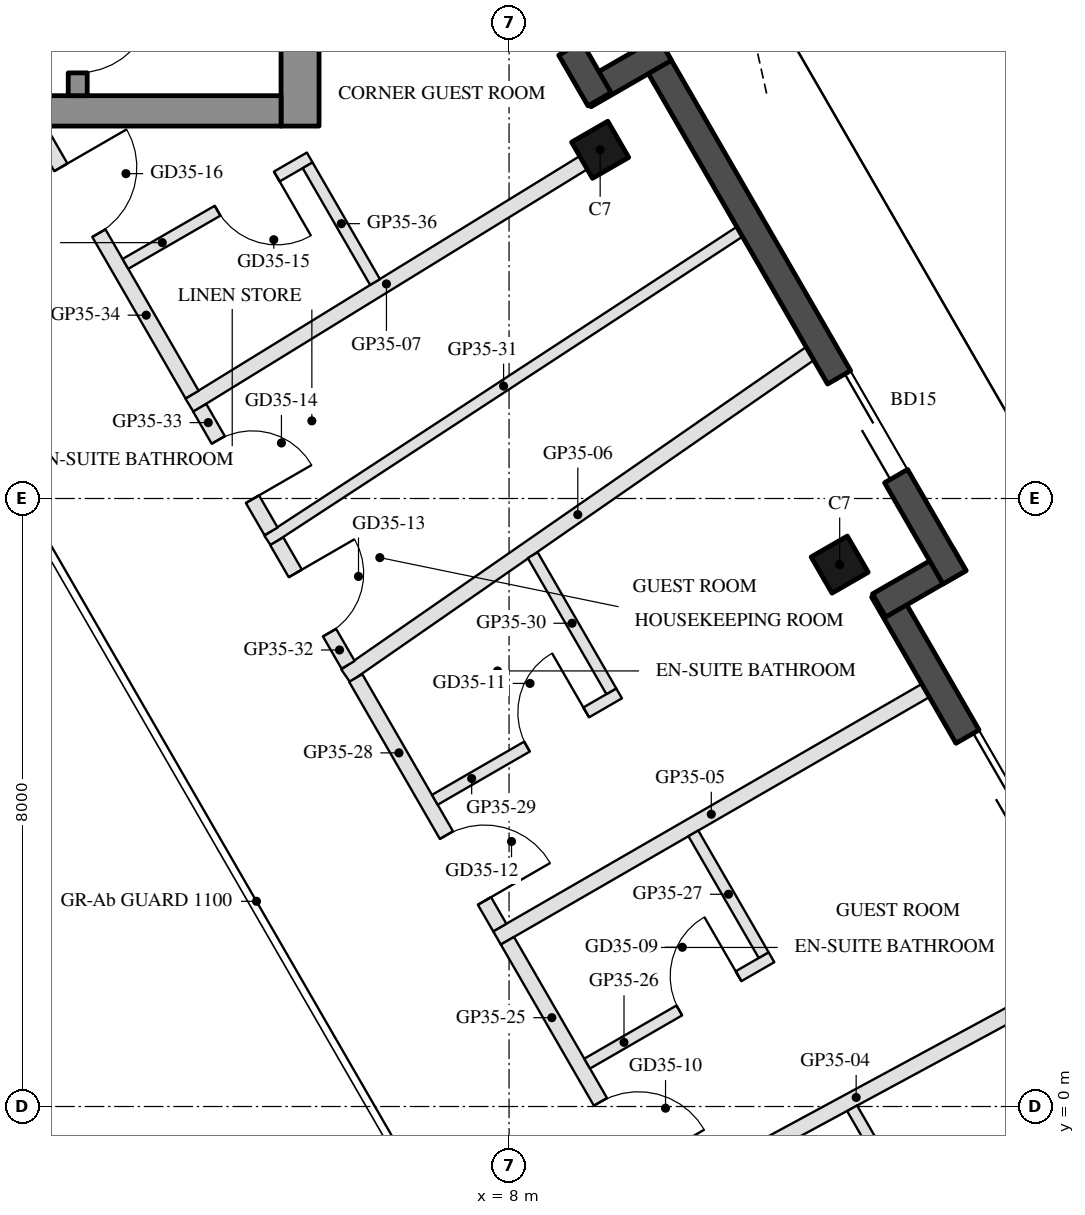
"""IFC4 building model, lengths in metres.
Left out: names, types, materials, properties, quantities, classifications, styles, units other than length and angle.
Written with IfcOpenShell. Run it as: python <this file> out.ifc"""

import sys

from ifc_helpers import new_model, si_unit, direction, frame, frame_2d, origin, origin_2d, place, context, subcontext, project, spatial, rectangle, hollow_rectangle, extrude, boolean, halfspace, element, fill, save


model = new_model("IFC4")
c1 = context("Model", 3, precision=1e-05, world=origin(), true_north=direction((0.0, 1.0)))
c2 = subcontext(c1, "Body", "Model", "MODEL_VIEW")
j1 = project(units=[si_unit("LENGTHUNIT", "METRE"), si_unit("PLANEANGLEUNIT", "RADIAN")], contexts=[c1])
p1 = place(None, origin())
s1 = spatial("IfcSite", under=j1, at=p1, CompositionType="ELEMENT")
p2 = place(p1, origin())
s2 = spatial("IfcBuilding", under=s1, at=p2, CompositionType="ELEMENT")
p3 = place(p2, frame((0.0, 0.0, 324.4)))
s3 = spatial("IfcBuildingStorey", under=s2, at=p3, CompositionType="ELEMENT", Elevation=324.4)
p4 = place(p3, frame((12.35, 7.13, 0.0), z_axis=(0.0, 0.0, 1.0), x_axis=(-0.5, 0.866025403784, 0.0)))
e1 = element("IfcColumn", 1, at=p4, inside=s3, PredefinedType="COLUMN", context=c2, shape_type="SweptSolid", body=[
    boolean("DIFFERENCE", boolean("DIFFERENCE", extrude(hollow_rectangle(XDim=0.55, YDim=0.55, WallThickness=0.025, at=origin_2d()), origin(), (0.0, 0.0, 1.0), 3.7), halfspace(frame((0.0, 0.0, 0.031), z_axis=(0.0, 0.0, 1.0), x_axis=(1.0, 0.0, 0.0)), True)), halfspace(frame((0.0, 0.0, 3.669), z_axis=(0.0, 0.0, 1.0), x_axis=(1.0, 0.0, 0.0)), False)),
])
p5 = place(p3, frame((9.198, 12.588, 0.0), z_axis=(0.0, 0.0, 1.0), x_axis=(-0.5, 0.866025403784, 0.0)))
e2 = element("IfcColumn", 2, at=p5, inside=s3, PredefinedType="COLUMN", context=c2, shape_type="SweptSolid", body=[
    boolean("DIFFERENCE", boolean("DIFFERENCE", extrude(hollow_rectangle(XDim=0.55, YDim=0.55, WallThickness=0.025, at=origin_2d()), origin(), (0.0, 0.0, 1.0), 3.7), halfspace(frame((0.0, 0.0, 0.034), z_axis=(0.0, 0.0, 1.0), x_axis=(1.0, 0.0, 0.0)), True)), halfspace(frame((0.0, 0.0, 3.666), z_axis=(0.0, 0.0, 1.0), x_axis=(1.0, 0.0, 0.0)), False)),
])
p6 = place(p3, frame((15.492, 2.337, 0.0), z_axis=(0.0, 0.0, 1.0), x_axis=(-0.499999159329, 0.866025889145, 0.0)))
e3 = element("IfcWall", 3, at=p6, inside=s3, PredefinedType="SOLIDWALL", context=c2, shape_type="SweptSolid", body=[
    extrude(rectangle(XDim=5.143, YDim=0.35, at=frame_2d((2.571, 0.0))), origin(), (0.0, 0.0, 1.0), 3.55),
])
p7 = place(p6, frame((1.122, 0.0, 0.0)))
e4 = element("IfcOpeningElement", 4, at=p7, cuts=e3, PredefinedType="OPENING", context=c2, shape_type="SweptSolid", body=[
    extrude(rectangle(XDim=1.8, YDim=2.4, at=frame_2d((0.9, 1.2))), frame((0.0, 0.185, 0.0), z_axis=(0.0, -1.0, 0.0), x_axis=(1.0, 0.0, 0.0)), (0.0, 0.0, 1.0), 0.37),
])
p8 = place(p3, frame((12.868, 6.592, 0.0), z_axis=(0.0, 0.0, 1.0), x_axis=(0.866005645448, 0.500034220881, 0.0)))
e5 = element("IfcWall", 5, at=p8, inside=s3, PredefinedType="SOLIDWALL", context=c2, shape_type="SweptSolid", body=[
    extrude(rectangle(XDim=1.22, YDim=0.35, at=frame_2d((0.61, 0.0))), origin(), (0.0, 0.0, 1.0), 3.55),
])
p9 = place(p3, frame((13.861, 6.963, 0.0), z_axis=(0.0, 0.0, 1.0), x_axis=(-0.499985896038, 0.866033546558, 0.0)))
e6 = element("IfcWall", 6, at=p9, inside=s3, PredefinedType="SOLIDWALL", context=c2, shape_type="SweptSolid", body=[
    extrude(rectangle(XDim=8.102, YDim=0.35, at=frame_2d((4.051, 0.0))), origin(), (0.0, 0.0, 1.0), 3.55),
])
p10 = place(p9, frame((1.537, 0.0, 0.0)))
e7 = element("IfcOpeningElement", 7, at=p10, cuts=e6, PredefinedType="OPENING", context=c2, shape_type="SweptSolid", body=[
    extrude(rectangle(XDim=1.5, YDim=2.4, at=frame_2d((0.75, 1.2))), frame((0.0, 0.185, 0.0), z_axis=(0.0, -1.0, 0.0), x_axis=(1.0, 0.0, 0.0)), (0.0, 0.0, 1.0), 0.37),
])
p11 = place(p3, frame((10.049, 13.916, 0.0), z_axis=(0.0, 0.0, 1.0), x_axis=(-0.866005645448, -0.500034220881, 0.0)))
e8 = element("IfcWall", 8, at=p11, inside=s3, PredefinedType="SOLIDWALL", context=c2, shape_type="SweptSolid", body=[
    extrude(rectangle(XDim=1.22, YDim=0.35, at=frame_2d((0.61, 0.0))), origin(), (0.0, 0.0, 1.0), 3.55),
])
p12 = place(p3, frame((9.19, 13.253, 0.0), z_axis=(0.0, 0.0, 1.0), x_axis=(-0.499963552308, 0.866046445846, 0.0)))
e9 = element("IfcWall", 9, at=p12, inside=s3, PredefinedType="SOLIDWALL", context=c2, shape_type="SweptSolid", body=[
    extrude(rectangle(XDim=5.143, YDim=0.35, at=frame_2d((2.571, 0.0))), origin(), (0.0, 0.0, 1.0), 3.55),
])
p13 = place(p12, frame((0.77, 0.0, 0.0)))
e10 = element("IfcOpeningElement", 10, at=p13, cuts=e9, PredefinedType="OPENING", context=c2, shape_type="SweptSolid", body=[
    extrude(rectangle(XDim=2.4, YDim=2.4, at=frame_2d((1.2, 1.2))), frame((0.0, 0.185, 0.0), z_axis=(0.0, -1.0, 0.0), x_axis=(1.0, 0.0, 0.0)), (0.0, 0.0, 1.0), 0.37),
])
p14 = place(p12, frame((3.47, 0.0, 0.3)))
e11 = element("IfcOpeningElement", 11, at=p14, cuts=e9, PredefinedType="OPENING", context=c2, shape_type="SweptSolid", body=[
    extrude(rectangle(XDim=1.3, YDim=2.65, at=frame_2d((0.65, 1.325))), frame((0.0, 0.185, 0.0), z_axis=(0.0, -1.0, 0.0), x_axis=(1.0, 0.0, 0.0)), (0.0, 0.0, 1.0), 0.37),
])
p15 = place(p3, frame((5.25, 12.9, 0.0), z_axis=(0.0, 0.0, 1.0), x_axis=(0.0, 1.0, 0.0)))
e12 = element("IfcWall", 12, at=p15, inside=s3, PredefinedType="SHEAR", context=c2, shape_type="SweptSolid", body=[
    extrude(rectangle(XDim=8.267, YDim=0.5, at=frame_2d((4.134, 0.0))), origin(), (0.0, 0.0, 1.0), 3.5),
])
p16 = place(p3, frame((5.0, 13.1, 0.0), z_axis=(0.0, 0.0, 1.0), x_axis=(-1.0, 0.0, 0.0)))
e13 = element("IfcWall", 13, at=p16, inside=s3, PredefinedType="SHEAR", context=c2, shape_type="SweptSolid", body=[
    extrude(rectangle(XDim=10.0, YDim=0.4, at=frame_2d((5.0, 0.0))), origin(), (0.0, 0.0, 1.0), 3.5),
])
p17 = place(p16, frame((3.55, 0.0, 0.0)))
e14 = element("IfcOpeningElement", 14, at=p17, cuts=e13, PredefinedType="OPENING", context=c2, shape_type="SweptSolid", body=[
    extrude(rectangle(XDim=1.1, YDim=2.1, at=frame_2d((0.55, 1.05))), frame((0.0, 0.21, 0.0), z_axis=(0.0, -1.0, 0.0), x_axis=(1.0, 0.0, 0.0)), (0.0, 0.0, 1.0), 0.42),
])
p18 = place(p16, frame((5.85, 0.0, 0.0)))
e15 = element("IfcOpeningElement", 15, at=p18, cuts=e13, PredefinedType="OPENING", context=c2, shape_type="SweptSolid", body=[
    extrude(rectangle(XDim=1.4, YDim=2.1, at=frame_2d((0.7, 1.05))), frame((0.0, 0.21, 0.0), z_axis=(0.0, -1.0, 0.0), x_axis=(1.0, 0.0, 0.0)), (0.0, 0.0, 1.0), 0.42),
])
p19 = place(p3, frame((2.325, 13.3, 0.0), z_axis=(0.0, 0.0, 1.0), x_axis=(0.0, 1.0, 0.0)))
e16 = element("IfcWall", 16, at=p19, inside=s3, PredefinedType="SHEAR", context=c2, shape_type="SweptSolid", body=[
    extrude(rectangle(XDim=6.45, YDim=0.25, at=frame_2d((3.225, 0.0))), origin(), (0.0, 0.0, 1.0), 3.5),
])
p20 = place(p19, frame((0.3, 0.0, 0.0)))
e17 = element("IfcOpeningElement", 17, at=p20, cuts=e16, PredefinedType="OPENING", context=c2, shape_type="SweptSolid", body=[
    extrude(rectangle(XDim=1.0, YDim=2.1, at=frame_2d((0.5, 1.05))), frame((0.0, 0.135, 0.0), z_axis=(0.0, -1.0, 0.0), x_axis=(1.0, 0.0, 0.0)), (0.0, 0.0, 1.0), 0.27),
])
p21 = place(p3, frame((15.244, 1.567, 0.0), z_axis=(0.0, 0.0, 1.0), x_axis=(-0.879711500968, -0.475507807575, 0.0)))
e18 = element("IfcWall", 18, at=p21, inside=s3, PredefinedType="PARTITIONING", context=c2, shape_type="SweptSolid", body=[
    extrude(rectangle(XDim=6.088, YDim=0.2, at=frame_2d((3.044, 0.0))), origin(), (0.0, 0.0, 1.0), 3.15),
])
p22 = place(p3, frame((13.48, 5.473, 0.0), z_axis=(0.0, 0.0, 1.0), x_axis=(-0.866030715483, -0.499990799755, 0.0)))
e19 = element("IfcWall", 19, at=p22, inside=s3, PredefinedType="PARTITIONING", context=c2, shape_type="SweptSolid", body=[
    extrude(rectangle(XDim=6.51, YDim=0.2, at=frame_2d((3.255, 0.0))), origin(), (0.0, 0.0, 1.0), 3.1),
])
p23 = place(p3, frame((11.959, 9.907, 0.0), z_axis=(0.0, 0.0, 1.0), x_axis=(-0.821566459399, -0.570112754454, 0.0)))
e20 = element("IfcWall", 20, at=p23, inside=s3, PredefinedType="PARTITIONING", context=c2, shape_type="SweptSolid", body=[
    extrude(rectangle(XDim=7.436, YDim=0.2, at=frame_2d((3.718, 0.0))), origin(), (0.0, 0.0, 1.0), 3.1),
])
p24 = place(p3, frame((8.979, 12.418, 0.0), z_axis=(0.0, 0.0, 1.0), x_axis=(-0.851645923852, -0.524117563516, 0.0)))
e21 = element("IfcWall", 21, at=p24, inside=s3, PredefinedType="PARTITIONING", context=c2, shape_type="SweptSolid", body=[
    extrude(rectangle(XDim=6.088, YDim=0.2, at=frame_2d((3.044, 0.0))), origin(), (0.0, 0.0, 1.0), 3.15),
])
p25 = place(p3, frame((13.4, -1.559, 0.0), z_axis=(0.0, 0.0, 1.0), x_axis=(-0.499988586725, 0.866031993141, 0.0)))
e22 = element("IfcWall", 22, at=p25, inside=s3, PredefinedType="PARTITIONING", context=c2, shape_type="SweptSolid", body=[
    extrude(rectangle(XDim=1.773, YDim=0.15, at=frame_2d((0.887, 0.0))), origin(), (0.0, 0.0, 1.0), 3.15),
])
p26 = place(p3, frame((7.978, 2.181, 0.0), z_axis=(0.0, 0.0, 1.0), x_axis=(0.499986368499, -0.866033273792, 0.0)))
e23 = element("IfcWall", 23, at=p26, inside=s3, PredefinedType="PARTITIONING", context=c2, shape_type="SweptSolid", body=[
    extrude(rectangle(XDim=3.897, YDim=0.2, at=frame_2d((1.948, 0.0))), origin(), (0.0, 0.0, 1.0), 3.15),
])
p27 = place(p26, frame((2.448, 0.0, 0.0)))
e24 = element("IfcOpeningElement", 24, at=p27, cuts=e23, PredefinedType="OPENING", context=c2, shape_type="SweptSolid", body=[
    extrude(rectangle(XDim=1.0, YDim=2.1, at=frame_2d((0.5, 1.05))), frame((0.0, 0.11, 0.0), z_axis=(0.0, -1.0, 0.0), x_axis=(1.0, 0.0, 0.0)), (0.0, 0.0, 1.0), 0.22),
])
p28 = place(p3, frame((9.027, 0.564, 0.0), z_axis=(0.0, 0.0, 1.0), x_axis=(0.866034573852, 0.49998411664, 0.0)))
e25 = element("IfcWall", 25, at=p28, inside=s3, PredefinedType="PARTITIONING", context=c2, shape_type="SweptSolid", body=[
    extrude(rectangle(XDim=2.8, YDim=0.15, at=frame_2d((1.4, 0.0))), origin(), (0.0, 0.0, 1.0), 3.55),
])
p29 = place(p28, frame((1.4, 0.0, 0.0)))
e26 = element("IfcOpeningElement", 26, at=p29, cuts=e25, PredefinedType="OPENING", context=c2, shape_type="SweptSolid", body=[
    extrude(rectangle(XDim=0.9, YDim=2.1, at=frame_2d((0.45, 1.05))), frame((0.0, 0.085, 0.0), z_axis=(0.0, -1.0, 0.0), x_axis=(1.0, 0.0, 0.0)), (0.0, 0.0, 1.0), 0.17),
])
p30 = place(p3, frame((11.35, 1.992, 0.0), z_axis=(0.0, 0.0, 1.0), x_axis=(-0.49994333299, 0.866058118026, 0.0)))
e27 = element("IfcWall", 27, at=p30, inside=s3, PredefinedType="PARTITIONING", context=c2, shape_type="SweptSolid", body=[
    extrude(rectangle(XDim=1.85, YDim=0.15, at=frame_2d((0.925, 0.0))), origin(), (0.0, 0.0, 1.0), 3.15),
])
p31 = place(p3, frame((5.982, 5.638, 0.0), z_axis=(0.0, 0.0, 1.0), x_axis=(0.500010442696, -0.866019374607, 0.0)))
e28 = element("IfcWall", 28, at=p31, inside=s3, PredefinedType="PARTITIONING", context=c2, shape_type="SweptSolid", body=[
    extrude(rectangle(XDim=3.792, YDim=0.2, at=frame_2d((1.896, 0.0))), origin(), (0.0, 0.0, 1.0), 3.15),
])
p32 = place(p31, frame((2.387, 0.0, 0.0)))
e29 = element("IfcOpeningElement", 29, at=p32, cuts=e28, PredefinedType="OPENING", context=c2, shape_type="SweptSolid", body=[
    extrude(rectangle(XDim=1.0, YDim=2.1, at=frame_2d((0.5, 1.05))), frame((0.0, 0.11, 0.0), z_axis=(0.0, -1.0, 0.0), x_axis=(1.0, 0.0, 0.0)), (0.0, 0.0, 1.0), 0.22),
])
p33 = place(p3, frame((7.023, 4.036, 0.0), z_axis=(0.0, 0.0, 1.0), x_axis=(0.866034573852, 0.49998411664, 0.0)))
e30 = element("IfcWall", 30, at=p33, inside=s3, PredefinedType="PARTITIONING", context=c2, shape_type="SweptSolid", body=[
    extrude(rectangle(XDim=2.8, YDim=0.15, at=frame_2d((1.4, 0.0))), origin(), (0.0, 0.0, 1.0), 3.15),
])
p34 = place(p33, frame((1.4, 0.0, 0.0)))
e31 = element("IfcOpeningElement", 31, at=p34, cuts=e30, PredefinedType="OPENING", context=c2, shape_type="SweptSolid", body=[
    extrude(rectangle(XDim=0.9, YDim=2.1, at=frame_2d((0.45, 1.05))), frame((0.0, 0.085, 0.0), z_axis=(0.0, -1.0, 0.0), x_axis=(1.0, 0.0, 0.0)), (0.0, 0.0, 1.0), 0.17),
])
p35 = place(p3, frame((9.346, 5.463, 0.0), z_axis=(0.0, 0.0, 1.0), x_axis=(-0.500049439734, 0.865996857859, 0.0)))
e32 = element("IfcWall", 32, at=p35, inside=s3, PredefinedType="PARTITIONING", context=c2, shape_type="SweptSolid", body=[
    extrude(rectangle(XDim=2.068, YDim=0.15, at=frame_2d((1.034, 0.0))), origin(), (0.0, 0.0, 1.0), 3.15),
])
p36 = place(p3, frame((11.034, 11.51, 0.0), z_axis=(0.0, 0.0, 1.0), x_axis=(-0.836911659743, -0.54733798862, 0.0)))
e33 = element("IfcWall", 33, at=p36, inside=s3, PredefinedType="PARTITIONING", context=c2, shape_type="SweptSolid", body=[
    extrude(rectangle(XDim=7.422, YDim=0.15, at=frame_2d((3.711, 0.0))), origin(), (0.0, 0.0, 1.0), 3.1),
])
p37 = place(p3, frame((4.944, 7.438, 0.0), z_axis=(0.0, 0.0, 1.0), x_axis=(0.499943868168, -0.866057809087, 0.0)))
e34 = element("IfcWall", 34, at=p37, inside=s3, PredefinedType="PARTITIONING", context=c2, shape_type="SweptSolid", body=[
    extrude(rectangle(XDim=1.877, YDim=0.2, at=frame_2d((0.938, 0.0))), origin(), (0.0, 0.0, 1.0), 3.15),
])
p38 = place(p37, frame((0.489, 0.0, 0.0)))
e35 = element("IfcOpeningElement", 35, at=p38, cuts=e34, PredefinedType="OPENING", context=c2, shape_type="SweptSolid", body=[
    extrude(rectangle(XDim=0.9, YDim=2.1, at=frame_2d((0.45, 1.05))), frame((0.0, 0.11, 0.0), z_axis=(0.0, -1.0, 0.0), x_axis=(1.0, 0.0, 0.0)), (0.0, 0.0, 1.0), 0.22),
])
p39 = place(p3, frame((3.93, 9.194, 0.0), z_axis=(0.0, 0.0, 1.0), x_axis=(0.499928798138, -0.866066508296, 0.0)))
e36 = element("IfcWall", 36, at=p39, inside=s3, PredefinedType="PARTITIONING", context=c2, shape_type="SweptSolid", body=[
    extrude(rectangle(XDim=1.878, YDim=0.2, at=frame_2d((0.939, 0.0))), origin(), (0.0, 0.0, 1.0), 3.55),
])
p40 = place(p39, frame((0.489, 0.0, 0.0)))
e37 = element("IfcOpeningElement", 37, at=p40, cuts=e36, PredefinedType="OPENING", context=c2, shape_type="SweptSolid", body=[
    extrude(rectangle(XDim=0.9, YDim=2.1, at=frame_2d((0.45, 1.05))), frame((0.0, 0.11, 0.0), z_axis=(0.0, -1.0, 0.0), x_axis=(1.0, 0.0, 0.0)), (0.0, 0.0, 1.0), 0.22),
])
p41 = place(p3, frame((1.819, 12.85, 0.0), z_axis=(0.0, 0.0, 1.0), x_axis=(0.499997437312, -0.866026883348, 0.0)))
e38 = element("IfcWall", 38, at=p41, inside=s3, PredefinedType="PARTITIONING", context=c2, shape_type="SweptSolid", body=[
    extrude(rectangle(XDim=4.022, YDim=0.2, at=frame_2d((2.011, 0.0))), origin(), (0.0, 0.0, 1.0), 3.15),
])
p42 = place(p41, frame((0.569, 0.0, 0.0)))
e39 = element("IfcOpeningElement", 39, at=p42, cuts=e38, PredefinedType="OPENING", context=c2, shape_type="SweptSolid", body=[
    extrude(rectangle(XDim=1.0, YDim=2.1, at=frame_2d((0.5, 1.05))), frame((0.0, 0.11, 0.0), z_axis=(0.0, -1.0, 0.0), x_axis=(1.0, 0.0, 0.0)), (0.0, 0.0, 1.0), 0.22),
])
p43 = place(p3, frame((5.377, 12.487, 0.0), z_axis=(0.0, 0.0, 1.0), x_axis=(-0.865996816683, -0.500049511043, 0.0)))
e40 = element("IfcWall", 40, at=p43, inside=s3, PredefinedType="PARTITIONING", context=c2, shape_type="SweptSolid", body=[
    extrude(rectangle(XDim=2.8, YDim=0.15, at=frame_2d((1.4, 0.0))), origin(), (0.0, 0.0, 1.0), 3.55),
])
p44 = place(p43, frame((0.5, 0.0, 0.0)))
e41 = element("IfcOpeningElement", 41, at=p44, cuts=e40, PredefinedType="OPENING", context=c2, shape_type="SweptSolid", body=[
    extrude(rectangle(XDim=0.9, YDim=2.1, at=frame_2d((0.45, 1.05))), frame((0.0, 0.085, 0.0), z_axis=(0.0, -1.0, 0.0), x_axis=(1.0, 0.0, 0.0)), (0.0, 0.0, 1.0), 0.17),
])
p45 = place(p3, frame((6.237, 10.848, 0.0), z_axis=(0.0, 0.0, 1.0), x_axis=(-0.500091824179, 0.865972382579, 0.0)))
e42 = element("IfcWall", 42, at=p45, inside=s3, PredefinedType="PARTITIONING", context=c2, shape_type="SweptSolid", body=[
    extrude(rectangle(XDim=1.774, YDim=0.15, at=frame_2d((0.887, 0.0))), origin(), (0.0, 0.0, 1.0), 3.15),
])
p46 = place(p7, frame((1.8, 0.0, 0.0), z_axis=(0.0, 0.0, 1.0), x_axis=(-1.0, 0.0, 0.0)))
e43 = element("IfcDoor", 43, at=p46, inside=s3, OperationType="SLIDING_TO_LEFT", PredefinedType="DOOR", context=c2, shape_type="SweptSolid", body=[
    extrude(rectangle(XDim=1.8, YDim=2.4, at=frame_2d((0.9, 1.2))), frame((0.0, 0.025, 0.0), z_axis=(0.0, -1.0, 0.0), x_axis=(1.0, 0.0, 0.0)), (0.0, 0.0, 1.0), 0.05),
])
fill(e4, e43)
p47 = place(p10, frame((1.5, 0.0, 0.0), z_axis=(0.0, 0.0, 1.0), x_axis=(-1.0, 0.0, 0.0)))
e44 = element("IfcDoor", 44, at=p47, inside=s3, OperationType="SLIDING_TO_LEFT", PredefinedType="DOOR", context=c2, shape_type="SweptSolid", body=[
    extrude(rectangle(XDim=1.5, YDim=2.4, at=frame_2d((0.75, 1.2))), frame((0.0, 0.025, 0.0), z_axis=(0.0, -1.0, 0.0), x_axis=(1.0, 0.0, 0.0)), (0.0, 0.0, 1.0), 0.05),
])
fill(e7, e44)
p48 = place(p20, frame((1.0, 0.0, 0.0), z_axis=(0.0, 0.0, 1.0), x_axis=(-1.0, 0.0, 0.0)))
e45 = element("IfcDoor", 45, at=p48, inside=s3, OperationType="SINGLE_SWING_LEFT", PredefinedType="DOOR", context=c2, shape_type="SweptSolid", body=[
    extrude(rectangle(XDim=1.0, YDim=2.1, at=frame_2d((0.5, 1.05))), frame((0.0, 0.025, 0.0), z_axis=(0.0, -1.0, 0.0), x_axis=(1.0, 0.0, 0.0)), (0.0, 0.0, 1.0), 0.05),
])
fill(e17, e45)
p49 = place(p29, origin())
e46 = element("IfcDoor", 46, at=p49, inside=s3, OperationType="SINGLE_SWING_RIGHT", PredefinedType="DOOR", context=c2, shape_type="SweptSolid", body=[
    extrude(rectangle(XDim=0.9, YDim=2.1, at=frame_2d((0.45, 1.05))), frame((0.0, 0.025, 0.0), z_axis=(0.0, -1.0, 0.0), x_axis=(1.0, 0.0, 0.0)), (0.0, 0.0, 1.0), 0.05),
])
fill(e26, e46)
p50 = place(p27, origin())
e47 = element("IfcDoor", 47, at=p50, inside=s3, OperationType="SINGLE_SWING_RIGHT", PredefinedType="DOOR", context=c2, shape_type="SweptSolid", body=[
    extrude(rectangle(XDim=1.0, YDim=2.1, at=frame_2d((0.5, 1.05))), frame((0.0, 0.025, 0.0), z_axis=(0.0, -1.0, 0.0), x_axis=(1.0, 0.0, 0.0)), (0.0, 0.0, 1.0), 0.05),
])
fill(e24, e47)
p51 = place(p34, origin())
e48 = element("IfcDoor", 48, at=p51, inside=s3, OperationType="SINGLE_SWING_RIGHT", PredefinedType="DOOR", context=c2, shape_type="SweptSolid", body=[
    extrude(rectangle(XDim=0.9, YDim=2.1, at=frame_2d((0.45, 1.05))), frame((0.0, 0.025, 0.0), z_axis=(0.0, -1.0, 0.0), x_axis=(1.0, 0.0, 0.0)), (0.0, 0.0, 1.0), 0.05),
])
fill(e31, e48)
p52 = place(p32, origin())
e49 = element("IfcDoor", 49, at=p52, inside=s3, OperationType="SINGLE_SWING_RIGHT", PredefinedType="DOOR", context=c2, shape_type="SweptSolid", body=[
    extrude(rectangle(XDim=1.0, YDim=2.1, at=frame_2d((0.5, 1.05))), frame((0.0, 0.025, 0.0), z_axis=(0.0, -1.0, 0.0), x_axis=(1.0, 0.0, 0.0)), (0.0, 0.0, 1.0), 0.05),
])
fill(e29, e49)
p53 = place(p38, origin())
e50 = element("IfcDoor", 50, at=p53, inside=s3, OperationType="SINGLE_SWING_LEFT", PredefinedType="DOOR", context=c2, shape_type="SweptSolid", body=[
    extrude(rectangle(XDim=0.9, YDim=2.1, at=frame_2d((0.45, 1.05))), frame((0.0, 0.025, 0.0), z_axis=(0.0, -1.0, 0.0), x_axis=(1.0, 0.0, 0.0)), (0.0, 0.0, 1.0), 0.05),
])
fill(e35, e50)
p54 = place(p40, origin())
e51 = element("IfcDoor", 51, at=p54, inside=s3, OperationType="SINGLE_SWING_RIGHT", PredefinedType="DOOR", context=c2, shape_type="SweptSolid", body=[
    extrude(rectangle(XDim=0.9, YDim=2.1, at=frame_2d((0.45, 1.05))), frame((0.0, 0.025, 0.0), z_axis=(0.0, -1.0, 0.0), x_axis=(1.0, 0.0, 0.0)), (0.0, 0.0, 1.0), 0.05),
])
fill(e37, e51)
p55 = place(p44, origin())
e52 = element("IfcDoor", 52, at=p55, inside=s3, OperationType="SINGLE_SWING_LEFT", PredefinedType="DOOR", context=c2, shape_type="SweptSolid", body=[
    extrude(rectangle(XDim=0.9, YDim=2.1, at=frame_2d((0.45, 1.05))), frame((0.0, 0.025, 0.0), z_axis=(0.0, -1.0, 0.0), x_axis=(1.0, 0.0, 0.0)), (0.0, 0.0, 1.0), 0.05),
])
fill(e41, e52)
p56 = place(p42, origin())
e53 = element("IfcDoor", 53, at=p56, inside=s3, OperationType="SINGLE_SWING_LEFT", PredefinedType="DOOR", context=c2, shape_type="SweptSolid", body=[
    extrude(rectangle(XDim=1.0, YDim=2.1, at=frame_2d((0.5, 1.05))), frame((0.0, 0.025, 0.0), z_axis=(0.0, -1.0, 0.0), x_axis=(1.0, 0.0, 0.0)), (0.0, 0.0, 1.0), 0.05),
])
fill(e39, e53)
save(model, sys.argv[1])
